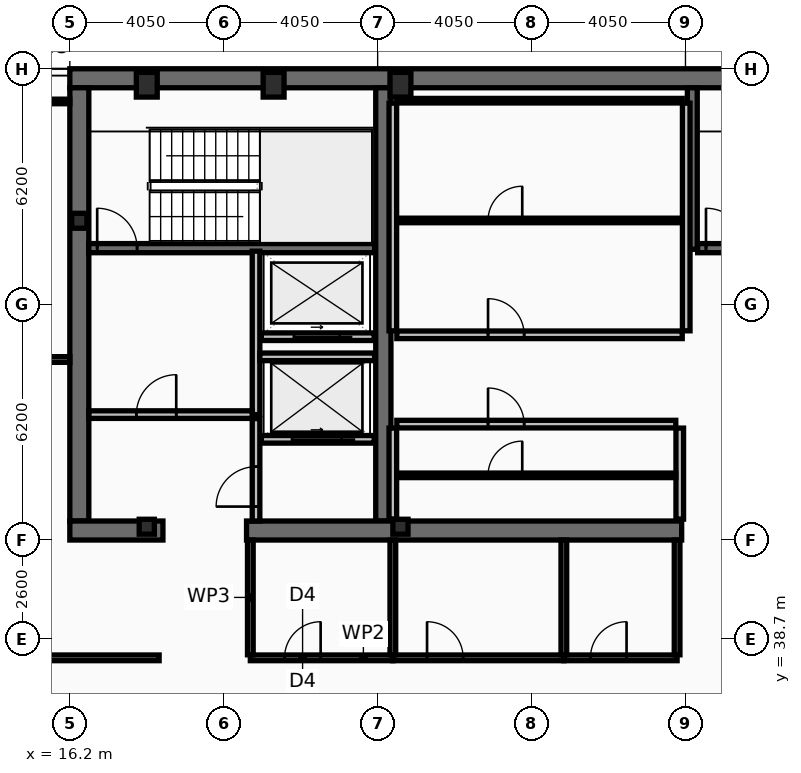
"""IFC4 building model, lengths in metres.
Left out: names, types, materials, properties, quantities, classifications, styles, units other than length and angle.
Written with IfcOpenShell. Run it as: python <this file> out.ifc"""

import sys

from ifc_helpers import new_model, si_unit, direction, frame, frame_2d, origin, origin_2d, place, context, subcontext, project, spatial, rectangle, hollow_rectangle, i_section, extrude, element, fill, save


model = new_model("IFC4")
c1 = context("Model", 3, precision=1e-05, world=origin(), true_north=direction((0.0, 1.0)))
c2 = subcontext(c1, "Body", "Model", "MODEL_VIEW")
j1 = project(units=[si_unit("LENGTHUNIT", "METRE"), si_unit("PLANEANGLEUNIT", "RADIAN")], contexts=[c1])
p1 = place(None, origin())
s1 = spatial("IfcSite", under=j1, at=p1, CompositionType="ELEMENT")
p2 = place(p1, origin())
s2 = spatial("IfcBuilding", under=s1, at=p2, CompositionType="ELEMENT")
p3 = place(p2, frame((0.0, 0.0, 347.0)))
s3 = spatial("IfcBuildingStorey", under=s2, at=p3, CompositionType="ELEMENT", Elevation=347.0)
p4 = place(p3, frame((16.2, 53.45, 0.0), z_axis=(0.0, 0.0, 1.0), x_axis=(1.0, 0.0, 0.0)))
e1 = element("IfcWall", 1, at=p4, inside=s3, PredefinedType="SHEAR", context=c2, shape_type="SweptSolid", body=[
    extrude(rectangle(XDim=40.5, YDim=0.5, at=frame_2d((20.25, 0.0))), origin(), (0.0, 0.0, 1.0), 3.38),
])
p5 = place(p3, frame((16.45, 41.8, 0.0), z_axis=(0.0, 0.0, 1.0), x_axis=(0.0, 1.0, 0.0)))
e2 = element("IfcWall", 2, at=p5, inside=s3, PredefinedType="SHEAR", context=c2, shape_type="SweptSolid", body=[
    extrude(rectangle(XDim=11.4, YDim=0.5, at=frame_2d((5.7, 0.0))), origin(), (0.0, 0.0, 1.0), 3.38),
])
p6 = place(p3, frame((24.45, 41.8, 0.0), z_axis=(0.0, 0.0, 1.0), x_axis=(0.0, 1.0, 0.0)))
e3 = element("IfcWall", 3, at=p6, inside=s3, PredefinedType="SHEAR", context=c2, shape_type="SweptSolid", body=[
    extrude(rectangle(XDim=11.4, YDim=0.4, at=frame_2d((5.7, 0.0))), origin(), (0.0, 0.0, 1.0), 3.38),
])
p7 = place(p3, frame((18.65, 41.55, 0.0), z_axis=(0.0, 0.0, 1.0), x_axis=(-1.0, 0.0, 0.0)))
e4 = element("IfcWall", 4, at=p7, inside=s3, PredefinedType="SHEAR", context=c2, shape_type="SweptSolid", body=[
    extrude(rectangle(XDim=2.45, YDim=0.5, at=frame_2d((1.225, 0.0))), origin(), (0.0, 0.0, 1.0), 3.38),
])
p8 = place(p3, frame((32.3, 41.55, 0.0), z_axis=(0.0, 0.0, 1.0), x_axis=(-1.0, 0.0, 0.0)))
e5 = element("IfcWall", 5, at=p8, inside=s3, PredefinedType="SHEAR", context=c2, shape_type="SweptSolid", body=[
    extrude(rectangle(XDim=11.45, YDim=0.5, at=frame_2d((5.725, 0.0))), origin(), (0.0, 0.0, 1.0), 3.38),
])
p9 = place(p3, frame((32.58, 48.95, 0.0), z_axis=(0.0, 0.0, 1.0), x_axis=(0.0, 1.0, 0.0)))
e6 = element("IfcWall", 6, at=p9, inside=s3, PredefinedType="SHEAR", context=c2, shape_type="SweptSolid", body=[
    extrude(rectangle(XDim=4.25, YDim=0.26, at=frame_2d((2.125, 0.0))), origin(), (0.0, 0.0, 1.0), 3.38),
])
p10 = place(p3, frame((16.7, 48.98, 0.0), z_axis=(0.0, 0.0, 1.0), x_axis=(1.0, 0.0, 0.0)))
e7 = element("IfcWall", 7, at=p10, inside=s3, PredefinedType="SHEAR", context=c2, shape_type="SweptSolid", body=[
    extrude(rectangle(XDim=7.52, YDim=0.24, at=frame_2d((3.76, 0.0))), origin(), (0.0, 0.0, 1.0), 3.38),
])
p11 = place(p10, frame((0.22, 0.0, 0.0)))
e8 = element("IfcOpeningElement", 8, at=p11, cuts=e7, PredefinedType="OPENING", context=c2, shape_type="SweptSolid", body=[
    extrude(rectangle(XDim=1.05, YDim=2.15, at=frame_2d((0.525, 1.075))), frame((0.0, 0.13, 0.0), z_axis=(0.0, -1.0, 0.0), x_axis=(1.0, 0.0, 0.0)), (0.0, 0.0, 1.0), 0.26),
])
p12 = place(p3, frame((32.72, 48.98, 0.0), z_axis=(0.0, 0.0, 1.0), x_axis=(1.0, 0.0, 0.0)))
e9 = element("IfcWall", 9, at=p12, inside=s3, PredefinedType="SHEAR", context=c2, shape_type="SweptSolid", body=[
    extrude(rectangle(XDim=7.56, YDim=0.24, at=frame_2d((3.78, 0.0))), origin(), (0.0, 0.0, 1.0), 3.38),
])
p13 = place(p12, frame((0.22, 0.0, 0.0)))
e10 = element("IfcOpeningElement", 10, at=p13, cuts=e9, PredefinedType="OPENING", context=c2, shape_type="SweptSolid", body=[
    extrude(rectangle(XDim=1.05, YDim=2.15, at=frame_2d((0.525, 1.075))), frame((0.0, 0.13, 0.0), z_axis=(0.0, -1.0, 0.0), x_axis=(1.0, 0.0, 0.0)), (0.0, 0.0, 1.0), 0.26),
])
for number, where, z_axis, x_axis in (
    (11, (18.225, 53.28, 0.0), (0.0, 0.0, 1.0), (1.0, 0.0, 0.0)),
    (12, (21.562, 53.28, 0.0), (0.0, 0.0, 1.0), (1.0, 0.0, 0.0)),
    (13, (24.9, 53.28, 0.0), (0.0, 0.0, 1.0), (1.0, 0.0, 0.0)),
):
    element("IfcColumn", number, at=place(p3, frame(where, z_axis=z_axis, x_axis=x_axis)), inside=s3, PredefinedType="COLUMN", context=c2, shape_type="SweptSolid", body=[
        extrude(hollow_rectangle(XDim=0.55, YDim=0.65, WallThickness=0.04, at=origin_2d()), origin(), (0.0, 0.0, 1.0), 3.6),
    ])
for number, where, z_axis, x_axis in (
    (14, (16.45, 49.7, 0.0), (0.0, 0.0, 1.0), (1.0, 0.0, 0.0)),
    (15, (18.225, 41.65, 0.0), (0.0, 0.0, 1.0), (1.0, 0.0, 0.0)),
    (16, (24.9, 41.65, 0.0), (0.0, 0.0, 1.0), (1.0, 0.0, 0.0)),
):
    element("IfcColumn", number, at=place(p3, frame(where, z_axis=z_axis, x_axis=x_axis)), inside=s3, PredefinedType="COLUMN", context=c2, shape_type="SweptSolid", body=[
        extrude(i_section(OverallWidth=0.399, OverallDepth=0.393, WebThickness=0.023, FlangeThickness=0.037, at=origin_2d()), origin(), (0.0, 0.0, 1.0), 3.6),
    ])
p14 = place(p3, frame((24.21, 43.95, 0.0), z_axis=(0.0, 0.0, 1.0), x_axis=(-1.0, 0.0, 0.0)))
e17 = element("IfcWall", 17, at=p14, inside=s3, PredefinedType="PARTITIONING", context=c2, shape_type="SweptSolid", body=[
    extrude(rectangle(XDim=2.97, YDim=0.2, at=frame_2d((1.485, 0.0))), origin(), (0.0, 0.0, 1.0), 3.38),
])
p15 = place(p14, frame((0.86, 0.0, 0.0)))
e18 = element("IfcOpeningElement", 18, at=p15, cuts=e17, PredefinedType="OPENING", context=c2, shape_type="SweptSolid", body=[
    extrude(rectangle(XDim=1.3, YDim=2.18, at=frame_2d((0.65, 1.09))), frame((0.0, 0.11, 0.0), z_axis=(0.0, -1.0, 0.0), x_axis=(1.0, 0.0, 0.0)), (0.0, 0.0, 1.0), 0.22),
])
p16 = place(p3, frame((24.21, 46.65, 0.0), z_axis=(0.0, 0.0, 1.0), x_axis=(-1.0, 0.0, 0.0)))
e19 = element("IfcWall", 19, at=p16, inside=s3, PredefinedType="PARTITIONING", context=c2, shape_type="SweptSolid", body=[
    extrude(rectangle(XDim=2.97, YDim=0.2, at=frame_2d((1.485, 0.0))), origin(), (0.0, 0.0, 1.0), 3.38),
])
p17 = place(p16, frame((0.91, 0.0, 0.0)))
e20 = element("IfcOpeningElement", 20, at=p17, cuts=e19, PredefinedType="OPENING", context=c2, shape_type="SweptSolid", body=[
    extrude(rectangle(XDim=1.2, YDim=2.18, at=frame_2d((0.6, 1.09))), frame((0.0, 0.11, 0.0), z_axis=(0.0, -1.0, 0.0), x_axis=(1.0, 0.0, 0.0)), (0.0, 0.0, 1.0), 0.22),
])
p18 = place(p3, frame((21.1, 44.6, 0.0), z_axis=(0.0, 0.0, 1.0), x_axis=(0.0, 1.0, 0.0)))
e21 = element("IfcWall", 21, at=p18, inside=s3, PredefinedType="PARTITIONING", context=c2, shape_type="SweptSolid", body=[
    extrude(rectangle(XDim=4.3, YDim=0.2, at=frame_2d((2.15, 0.0))), origin(), (0.0, 0.0, 1.0), 3.38),
])
p19 = place(p3, frame((16.7, 44.6, 0.0), z_axis=(0.0, 0.0, 1.0), x_axis=(1.0, 0.0, 0.0)))
e22 = element("IfcWall", 22, at=p19, inside=s3, PredefinedType="PARTITIONING", context=c2, shape_type="SweptSolid", body=[
    extrude(rectangle(XDim=4.3, YDim=0.2, at=frame_2d((2.15, 0.0))), origin(), (0.0, 0.0, 1.0), 3.38),
])
p20 = place(p19, frame((1.25, 0.0, 0.0)))
e23 = element("IfcOpeningElement", 23, at=p20, cuts=e22, PredefinedType="OPENING", context=c2, shape_type="SweptSolid", body=[
    extrude(rectangle(XDim=1.05, YDim=2.15, at=frame_2d((0.525, 1.075))), frame((0.0, 0.11, 0.0), z_axis=(0.0, -1.0, 0.0), x_axis=(1.0, 0.0, 0.0)), (0.0, 0.0, 1.0), 0.22),
])
p21 = place(p3, frame((21.2, 46.12, 0.0), z_axis=(0.0, 0.0, 1.0), x_axis=(1.0, 0.0, 0.0)))
e24 = element("IfcWall", 24, at=p21, inside=s3, PredefinedType="PARTITIONING", context=c2, shape_type="SweptSolid", body=[
    extrude(rectangle(XDim=3.02, YDim=0.2, at=frame_2d((1.51, 0.0))), origin(), (0.0, 0.0, 1.0), 3.38),
])
p22 = place(p3, frame((21.1, 41.8, 0.0), z_axis=(0.0, 0.0, 1.0), x_axis=(0.0, 1.0, 0.0)))
e25 = element("IfcWall", 25, at=p22, inside=s3, PredefinedType="PARTITIONING", context=c2, shape_type="SweptSolid", body=[
    extrude(rectangle(XDim=2.695, YDim=0.2, at=frame_2d((1.348, 0.0))), origin(), (0.0, 0.0, 1.0), 3.38),
])
p23 = place(p22, frame((0.38, 0.0, 0.0)))
e26 = element("IfcOpeningElement", 26, at=p23, cuts=e25, PredefinedType="OPENING", context=c2, shape_type="SweptSolid", body=[
    extrude(rectangle(XDim=1.05, YDim=2.15, at=frame_2d((0.525, 1.075))), frame((0.0, 0.11, 0.0), z_axis=(0.0, -1.0, 0.0), x_axis=(1.0, 0.0, 0.0)), (0.0, 0.0, 1.0), 0.22),
])
for number, where, z_axis, x_axis in (
    (27, (24.7, 46.805, 0.0), (0.0, 0.0, 1.0), (0.0, 1.0, 0.0)),
    (28, (32.42, 46.805, 0.0), (0.0, 0.0, 1.0), (0.0, 1.0, 0.0)),
):
    element("IfcWall", number, at=place(p3, frame(where, z_axis=z_axis, x_axis=x_axis)), inside=s3, PredefinedType="PARTITIONING", context=c2, shape_type="SweptSolid", body=[
        extrude(rectangle(XDim=5.99, YDim=0.2, at=frame_2d((2.995, 0.0))), origin(), (0.0, 0.0, 1.0), 3.38),
    ])
p24 = place(p3, frame((24.805, 52.86, 0.0), z_axis=(0.0, 0.0, 1.0), x_axis=(1.0, 0.0, 0.0)))
e29 = element("IfcWall", 29, at=p24, inside=s3, PredefinedType="PARTITIONING", context=c2, shape_type="SweptSolid", body=[
    extrude(rectangle(XDim=7.51, YDim=0.12, at=frame_2d((3.755, 0.0))), origin(), (0.0, 0.0, 1.0), 3.38),
])
p25 = place(p3, frame((24.805, 49.709, 0.0), z_axis=(0.0, 0.0, 1.0), x_axis=(1.0, 0.0, 0.0)))
e30 = element("IfcWall", 30, at=p25, inside=s3, PredefinedType="PARTITIONING", context=c2, shape_type="SweptSolid", body=[
    extrude(rectangle(XDim=7.51, YDim=0.12, at=frame_2d((3.755, 0.0))), origin(), (0.0, 0.0, 1.0), 3.38),
])
p26 = place(p25, frame((2.4, 0.0, 0.0)))
e31 = element("IfcOpeningElement", 31, at=p26, cuts=e30, PredefinedType="OPENING", context=c2, shape_type="SweptSolid", body=[
    extrude(rectangle(XDim=0.9, YDim=2.05, at=frame_2d((0.45, 1.025))), frame((0.0, 0.07, 0.0), z_axis=(0.0, -1.0, 0.0), x_axis=(1.0, 0.0, 0.0)), (0.0, 0.0, 1.0), 0.14),
])
p27 = place(p3, frame((24.805, 46.7, 0.0), z_axis=(0.0, 0.0, 1.0), x_axis=(1.0, 0.0, 0.0)))
e32 = element("IfcWall", 32, at=p27, inside=s3, PredefinedType="PARTITIONING", context=c2, shape_type="SweptSolid", body=[
    extrude(rectangle(XDim=7.51, YDim=0.2, at=frame_2d((3.755, 0.0))), origin(), (0.0, 0.0, 1.0), 3.38),
])
p28 = place(p27, frame((2.4, 0.0, 0.0)))
e33 = element("IfcOpeningElement", 33, at=p28, cuts=e32, PredefinedType="OPENING", context=c2, shape_type="SweptSolid", body=[
    extrude(rectangle(XDim=0.95, YDim=2.1, at=frame_2d((0.475, 1.05))), frame((0.0, 0.11, 0.0), z_axis=(0.0, -1.0, 0.0), x_axis=(1.0, 0.0, 0.0)), (0.0, 0.0, 1.0), 0.22),
])
for number, where, z_axis, x_axis in (
    (34, (24.7, 41.85, 0.0), (0.0, 0.0, 1.0), (0.0, 1.0, 0.0)),
    (35, (32.25, 41.85, 0.0), (0.0, 0.0, 1.0), (0.0, 1.0, 0.0)),
):
    element("IfcWall", number, at=place(p3, frame(where, z_axis=z_axis, x_axis=x_axis)), inside=s3, PredefinedType="PARTITIONING", context=c2, shape_type="SweptSolid", body=[
        extrude(rectangle(XDim=2.395, YDim=0.2, at=frame_2d((1.198, 0.0))), origin(), (0.0, 0.0, 1.0), 3.38),
    ])
p29 = place(p3, frame((24.805, 43.002, 0.0), z_axis=(0.0, 0.0, 1.0), x_axis=(1.0, 0.0, 0.0)))
e36 = element("IfcWall", 36, at=p29, inside=s3, PredefinedType="PARTITIONING", context=c2, shape_type="SweptSolid", body=[
    extrude(rectangle(XDim=7.34, YDim=0.12, at=frame_2d((3.67, 0.0))), origin(), (0.0, 0.0, 1.0), 3.38),
])
p30 = place(p29, frame((2.4, 0.0, 0.0)))
e37 = element("IfcOpeningElement", 37, at=p30, cuts=e36, PredefinedType="OPENING", context=c2, shape_type="SweptSolid", body=[
    extrude(rectangle(XDim=0.9, YDim=2.05, at=frame_2d((0.45, 1.025))), frame((0.0, 0.07, 0.0), z_axis=(0.0, -1.0, 0.0), x_axis=(1.0, 0.0, 0.0)), (0.0, 0.0, 1.0), 0.14),
])
p31 = place(p3, frame((24.805, 44.35, 0.0), z_axis=(0.0, 0.0, 1.0), x_axis=(1.0, 0.0, 0.0)))
e38 = element("IfcWall", 38, at=p31, inside=s3, PredefinedType="PARTITIONING", context=c2, shape_type="SweptSolid", body=[
    extrude(rectangle(XDim=7.34, YDim=0.2, at=frame_2d((3.67, 0.0))), origin(), (0.0, 0.0, 1.0), 3.38),
])
p32 = place(p31, frame((2.4, 0.0, 0.0)))
e39 = element("IfcOpeningElement", 39, at=p32, cuts=e38, PredefinedType="OPENING", context=c2, shape_type="SweptSolid", body=[
    extrude(rectangle(XDim=0.95, YDim=2.1, at=frame_2d((0.475, 1.05))), frame((0.0, 0.11, 0.0), z_axis=(0.0, -1.0, 0.0), x_axis=(1.0, 0.0, 0.0)), (0.0, 0.0, 1.0), 0.22),
])
p33 = place(p3, frame((20.95, 38.2, 0.0), z_axis=(0.0, 0.0, 1.0), x_axis=(1.0, 0.0, 0.0)))
e40 = element("IfcWall", 40, at=p33, inside=s3, PredefinedType="PARTITIONING", context=c2, shape_type="SweptSolid", body=[
    extrude(rectangle(XDim=3.75, YDim=0.15, at=frame_2d((1.875, 0.0))), origin(), (0.0, 0.0, 1.0), 2.77),
])
p34 = place(p33, frame((0.9, 0.0, 0.0)))
e41 = element("IfcOpeningElement", 41, at=p34, cuts=e40, PredefinedType="OPENING", context=c2, shape_type="SweptSolid", body=[
    extrude(rectangle(XDim=0.95, YDim=2.05, at=frame_2d((0.475, 1.025))), frame((0.0, 0.085, 0.0), z_axis=(0.0, -1.0, 0.0), x_axis=(1.0, 0.0, 0.0)), (0.0, 0.0, 1.0), 0.17),
])
p35 = place(p3, frame((24.7, 38.2, 0.0), z_axis=(0.0, 0.0, 1.0), x_axis=(1.0, 0.0, 0.0)))
e42 = element("IfcWall", 42, at=p35, inside=s3, PredefinedType="PARTITIONING", context=c2, shape_type="SweptSolid", body=[
    extrude(rectangle(XDim=4.5, YDim=0.15, at=frame_2d((2.25, 0.0))), origin(), (0.0, 0.0, 1.0), 2.77),
])
p36 = place(p35, frame((0.9, 0.0, 0.0)))
e43 = element("IfcOpeningElement", 43, at=p36, cuts=e42, PredefinedType="OPENING", context=c2, shape_type="SweptSolid", body=[
    extrude(rectangle(XDim=0.95, YDim=2.05, at=frame_2d((0.475, 1.025))), frame((0.0, 0.085, 0.0), z_axis=(0.0, -1.0, 0.0), x_axis=(1.0, 0.0, 0.0)), (0.0, 0.0, 1.0), 0.17),
])
p37 = place(p3, frame((29.2, 38.2, 0.0), z_axis=(0.0, 0.0, 1.0), x_axis=(1.0, 0.0, 0.0)))
e44 = element("IfcWall", 44, at=p37, inside=s3, PredefinedType="PARTITIONING", context=c2, shape_type="SweptSolid", body=[
    extrude(rectangle(XDim=2.98, YDim=0.15, at=frame_2d((1.49, 0.0))), origin(), (0.0, 0.0, 1.0), 3.38),
])
p38 = place(p37, frame((0.7, 0.0, 0.0)))
e45 = element("IfcOpeningElement", 45, at=p38, cuts=e44, PredefinedType="OPENING", context=c2, shape_type="SweptSolid", body=[
    extrude(rectangle(XDim=0.95, YDim=2.05, at=frame_2d((0.475, 1.025))), frame((0.0, 0.085, 0.0), z_axis=(0.0, -1.0, 0.0), x_axis=(1.0, 0.0, 0.0)), (0.0, 0.0, 1.0), 0.17),
])
p39 = place(p3, frame((20.95, 38.28, 0.0), z_axis=(0.0, 0.0, 1.0), x_axis=(0.0, 1.0, 0.0)))
e46 = element("IfcWall", 46, at=p39, inside=s3, PredefinedType="PARTITIONING", context=c2, shape_type="SweptSolid", body=[
    extrude(rectangle(XDim=3.02, YDim=0.15, at=frame_2d((1.51, 0.0))), origin(), (0.0, 0.0, 1.0), 3.38),
])
p40 = place(p3, frame((24.7, 38.28, 0.0), z_axis=(0.0, 0.0, 1.0), x_axis=(0.0, 1.0, 0.0)))
e47 = element("IfcWall", 47, at=p40, inside=s3, PredefinedType="PARTITIONING", context=c2, shape_type="SweptSolid", body=[
    extrude(rectangle(XDim=3.02, YDim=0.15, at=frame_2d((1.51, 0.0))), origin(), (0.0, 0.0, 1.0), 2.77),
])
for number, where, z_axis, x_axis in (
    (48, (29.2, 38.28, 0.0), (0.0, 0.0, 1.0), (0.0, 1.0, 0.0)),
    (49, (32.18, 38.28, 0.0), (0.0, 0.0, 1.0), (0.0, 1.0, 0.0)),
):
    element("IfcWall", number, at=place(p3, frame(where, z_axis=z_axis, x_axis=x_axis)), inside=s3, PredefinedType="PARTITIONING", context=c2, shape_type="SweptSolid", body=[
        extrude(rectangle(XDim=3.02, YDim=0.15, at=frame_2d((1.51, 0.0))), origin(), (0.0, 0.0, 1.0), 3.38),
    ])
p41 = place(p3, frame((12.03, 38.2, 0.0), z_axis=(0.0, 0.0, 1.0), x_axis=(1.0, 0.0, 0.0)))
e50 = element("IfcWall", 50, at=p41, inside=s3, PredefinedType="PARTITIONING", context=c2, shape_type="SweptSolid", body=[
    extrude(rectangle(XDim=6.52, YDim=0.15, at=frame_2d((3.26, 0.0))), origin(), (0.0, 0.0, 1.0), 2.77),
])
p42 = place(p41, frame((2.32, 0.0, 0.0)))
e51 = element("IfcOpeningElement", 51, at=p42, cuts=e50, PredefinedType="OPENING", context=c2, shape_type="SweptSolid", body=[
    extrude(rectangle(XDim=0.95, YDim=2.05, at=frame_2d((0.475, 1.025))), frame((0.0, 0.085, 0.0), z_axis=(0.0, -1.0, 0.0), x_axis=(1.0, 0.0, 0.0)), (0.0, 0.0, 1.0), 0.17),
])
p43 = place(p3, frame((12.095, 46.05, 0.0), z_axis=(0.0, 0.0, 1.0), x_axis=(1.0, 0.0, 0.0)))
e52 = element("IfcWall", 52, at=p43, inside=s3, PredefinedType="PARTITIONING", context=c2, shape_type="SweptSolid", body=[
    extrude(rectangle(XDim=4.105, YDim=0.15, at=frame_2d((2.052, 0.0))), origin(), (0.0, 0.0, 1.0), 2.82),
])
p44 = place(p43, frame((2.32, 0.0, 0.0)))
e53 = element("IfcOpeningElement", 53, at=p44, cuts=e52, PredefinedType="OPENING", context=c2, shape_type="SweptSolid", body=[
    extrude(rectangle(XDim=0.9, YDim=2.05, at=frame_2d((0.45, 1.025))), frame((0.0, 0.085, 0.0), z_axis=(0.0, -1.0, 0.0), x_axis=(1.0, 0.0, 0.0)), (0.0, 0.0, 1.0), 0.17),
])
p45 = place(p3, frame((12.095, 52.84, 0.0), z_axis=(0.0, 0.0, 1.0), x_axis=(1.0, 0.0, 0.0)))
e54 = element("IfcWall", 54, at=p45, inside=s3, PredefinedType="PARTITIONING", context=c2, shape_type="SweptSolid", body=[
    extrude(rectangle(XDim=4.105, YDim=0.12, at=frame_2d((2.052, 0.0))), origin(), (0.0, 0.0, 1.0), 3.38),
])
p46 = place(p11, origin())
e55 = element("IfcDoor", 55, at=p46, inside=s3, OperationType="SINGLE_SWING_LEFT", PredefinedType="DOOR", context=c2, shape_type="SweptSolid", body=[
    extrude(rectangle(XDim=1.05, YDim=2.15, at=frame_2d((0.525, 1.075))), frame((0.0, 0.025, 0.0), z_axis=(0.0, -1.0, 0.0), x_axis=(1.0, 0.0, 0.0)), (0.0, 0.0, 1.0), 0.05),
])
fill(e8, e55)
p47 = place(p13, origin())
e56 = element("IfcDoor", 56, at=p47, inside=s3, OperationType="SINGLE_SWING_LEFT", PredefinedType="DOOR", context=c2, shape_type="SweptSolid", body=[
    extrude(rectangle(XDim=1.05, YDim=2.15, at=frame_2d((0.525, 1.075))), frame((0.0, 0.025, 0.0), z_axis=(0.0, -1.0, 0.0), x_axis=(1.0, 0.0, 0.0)), (0.0, 0.0, 1.0), 0.05),
])
fill(e10, e56)
p48 = place(p15, origin())
e57 = element("IfcDoor", 57, at=p48, inside=s3, OperationType="SLIDING_TO_LEFT", PredefinedType="DOOR", context=c2, shape_type="SweptSolid", body=[
    extrude(rectangle(XDim=1.3, YDim=2.18, at=frame_2d((0.65, 1.09))), frame((0.0, 0.025, 0.0), z_axis=(0.0, -1.0, 0.0), x_axis=(1.0, 0.0, 0.0)), (0.0, 0.0, 1.0), 0.05),
])
fill(e18, e57)
p49 = place(p17, origin())
e58 = element("IfcDoor", 58, at=p49, inside=s3, OperationType="SLIDING_TO_LEFT", PredefinedType="DOOR", context=c2, shape_type="SweptSolid", body=[
    extrude(rectangle(XDim=1.2, YDim=2.18, at=frame_2d((0.6, 1.09))), frame((0.0, 0.025, 0.0), z_axis=(0.0, -1.0, 0.0), x_axis=(1.0, 0.0, 0.0)), (0.0, 0.0, 1.0), 0.05),
])
fill(e20, e58)
p50 = place(p20, origin())
e59 = element("IfcDoor", 59, at=p50, inside=s3, OperationType="SINGLE_SWING_RIGHT", PredefinedType="DOOR", context=c2, shape_type="SweptSolid", body=[
    extrude(rectangle(XDim=1.05, YDim=2.15, at=frame_2d((0.525, 1.075))), frame((0.0, 0.025, 0.0), z_axis=(0.0, -1.0, 0.0), x_axis=(1.0, 0.0, 0.0)), (0.0, 0.0, 1.0), 0.05),
])
fill(e23, e59)
p51 = place(p23, origin())
e60 = element("IfcDoor", 60, at=p51, inside=s3, OperationType="SINGLE_SWING_LEFT", PredefinedType="DOOR", context=c2, shape_type="SweptSolid", body=[
    extrude(rectangle(XDim=1.05, YDim=2.15, at=frame_2d((0.525, 1.075))), frame((0.0, 0.025, 0.0), z_axis=(0.0, -1.0, 0.0), x_axis=(1.0, 0.0, 0.0)), (0.0, 0.0, 1.0), 0.05),
])
fill(e26, e60)
p52 = place(p26, origin())
e61 = element("IfcDoor", 61, at=p52, inside=s3, OperationType="SINGLE_SWING_RIGHT", PredefinedType="DOOR", context=c2, shape_type="SweptSolid", body=[
    extrude(rectangle(XDim=0.9, YDim=2.05, at=frame_2d((0.45, 1.025))), frame((0.0, 0.025, 0.0), z_axis=(0.0, -1.0, 0.0), x_axis=(1.0, 0.0, 0.0)), (0.0, 0.0, 1.0), 0.05),
])
fill(e31, e61)
p53 = place(p28, origin())
e62 = element("IfcDoor", 62, at=p53, inside=s3, OperationType="SINGLE_SWING_LEFT", PredefinedType="DOOR", context=c2, shape_type="SweptSolid", body=[
    extrude(rectangle(XDim=0.95, YDim=2.1, at=frame_2d((0.475, 1.05))), frame((0.0, 0.025, 0.0), z_axis=(0.0, -1.0, 0.0), x_axis=(1.0, 0.0, 0.0)), (0.0, 0.0, 1.0), 0.05),
])
fill(e33, e62)
p54 = place(p30, origin())
e63 = element("IfcDoor", 63, at=p54, inside=s3, OperationType="SINGLE_SWING_RIGHT", PredefinedType="DOOR", context=c2, shape_type="SweptSolid", body=[
    extrude(rectangle(XDim=0.9, YDim=2.05, at=frame_2d((0.45, 1.025))), frame((0.0, 0.025, 0.0), z_axis=(0.0, -1.0, 0.0), x_axis=(1.0, 0.0, 0.0)), (0.0, 0.0, 1.0), 0.05),
])
fill(e37, e63)
p55 = place(p32, origin())
e64 = element("IfcDoor", 64, at=p55, inside=s3, OperationType="SINGLE_SWING_LEFT", PredefinedType="DOOR", context=c2, shape_type="SweptSolid", body=[
    extrude(rectangle(XDim=0.95, YDim=2.1, at=frame_2d((0.475, 1.05))), frame((0.0, 0.025, 0.0), z_axis=(0.0, -1.0, 0.0), x_axis=(1.0, 0.0, 0.0)), (0.0, 0.0, 1.0), 0.05),
])
fill(e39, e64)
p56 = place(p34, origin())
e65 = element("IfcDoor", 65, at=p56, inside=s3, OperationType="SINGLE_SWING_RIGHT", PredefinedType="DOOR", context=c2, shape_type="SweptSolid", body=[
    extrude(rectangle(XDim=0.95, YDim=2.05, at=frame_2d((0.475, 1.025))), frame((0.0, 0.025, 0.0), z_axis=(0.0, -1.0, 0.0), x_axis=(1.0, 0.0, 0.0)), (0.0, 0.0, 1.0), 0.05),
])
fill(e41, e65)
p57 = place(p36, origin())
e66 = element("IfcDoor", 66, at=p57, inside=s3, OperationType="SINGLE_SWING_LEFT", PredefinedType="DOOR", context=c2, shape_type="SweptSolid", body=[
    extrude(rectangle(XDim=0.95, YDim=2.05, at=frame_2d((0.475, 1.025))), frame((0.0, 0.025, 0.0), z_axis=(0.0, -1.0, 0.0), x_axis=(1.0, 0.0, 0.0)), (0.0, 0.0, 1.0), 0.05),
])
fill(e43, e66)
p58 = place(p38, origin())
e67 = element("IfcDoor", 67, at=p58, inside=s3, OperationType="SINGLE_SWING_RIGHT", PredefinedType="DOOR", context=c2, shape_type="SweptSolid", body=[
    extrude(rectangle(XDim=0.95, YDim=2.05, at=frame_2d((0.475, 1.025))), frame((0.0, 0.025, 0.0), z_axis=(0.0, -1.0, 0.0), x_axis=(1.0, 0.0, 0.0)), (0.0, 0.0, 1.0), 0.05),
])
fill(e45, e67)
save(model, sys.argv[1])
